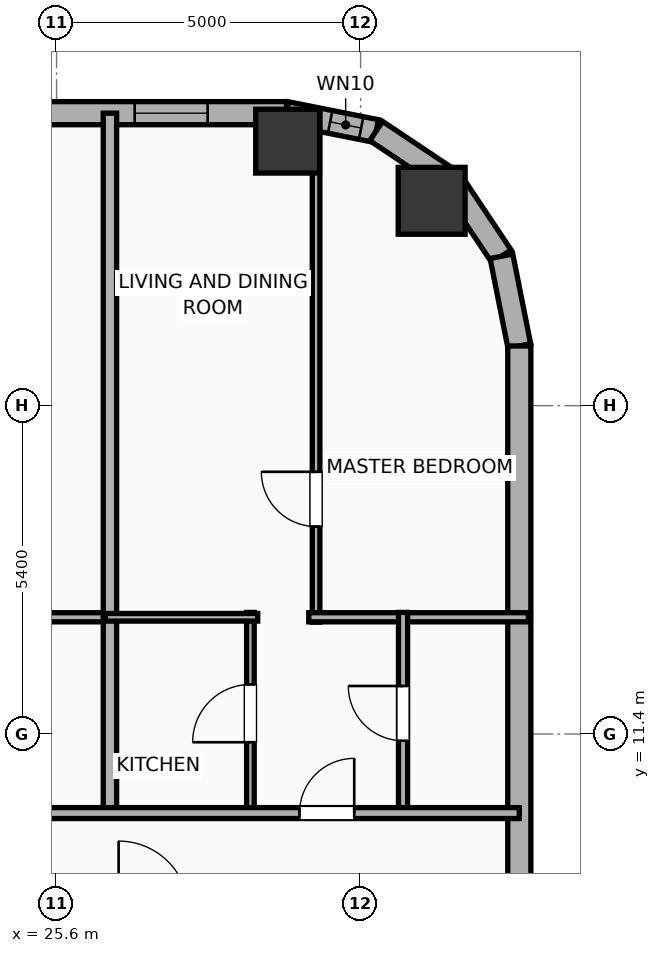
"""IFC4 building model, lengths in metres.
Left out: names, types, materials, properties, quantities, classifications, styles, units other than length and angle.
Written with IfcOpenShell. Run it as: python <this file> out.ifc"""

import sys

from ifc_helpers import new_model, si_unit, direction, frame, frame_2d, origin, origin_2d, place, context, subcontext, project, spatial, rectangle, hollow_rectangle, hollow_circle, extrude, element, fill, save


model = new_model("IFC4")
c1 = context("Model", 3, precision=1e-05, world=origin(), true_north=direction((0.0, 1.0)))
c2 = subcontext(c1, "Body", "Model", "MODEL_VIEW")
j1 = project(units=[si_unit("LENGTHUNIT", "METRE"), si_unit("PLANEANGLEUNIT", "RADIAN")], contexts=[c1])
p1 = place(None, origin())
s1 = spatial("IfcSite", under=j1, at=p1, CompositionType="ELEMENT")
p2 = place(p1, origin())
s2 = spatial("IfcBuilding", under=s1, at=p2, CompositionType="ELEMENT")
p3 = place(p2, frame((0.0, 0.0, 124.8)))
s3 = spatial("IfcBuildingStorey", under=s2, at=p3, CompositionType="ELEMENT", Elevation=124.8)
p4 = place(p3, frame((31.769, 20.169, 0.0), z_axis=(0.0, 0.0, 1.0), x_axis=(1.0, 0.0, 0.0)))
e1 = element("IfcColumn", 1, at=p4, inside=s3, PredefinedType="COLUMN", context=c2, shape_type="SweptSolid", body=[
    extrude(hollow_circle(Radius=0.55, WallThickness=0.036, at=origin_2d()), origin(), (0.0, 0.0, 1.0), 3.9),
])
p5 = place(p3, frame((29.4, 21.15, 0.0), z_axis=(0.0, 0.0, 1.0), x_axis=(1.0, 0.0, 0.0)))
e2 = element("IfcColumn", 2, at=p5, inside=s3, PredefinedType="COLUMN", context=c2, shape_type="SweptSolid", body=[
    extrude(hollow_rectangle(XDim=1.05, YDim=1.05, WallThickness=0.036, at=origin_2d()), origin(), (0.0, 0.0, 1.0), 3.9),
])
p6 = place(p3, frame((-25.381, 21.61, 0.0), z_axis=(0.0, 0.0, 1.0), x_axis=(1.0, 0.0, 0.0)))
e3 = element("IfcWall", 3, at=p6, inside=s3, PredefinedType="ELEMENTEDWALL", context=c2, shape_type="SweptSolid", body=[
    extrude(rectangle(XDim=54.763, YDim=0.38, at=frame_2d((27.381, 0.0))), origin(), (0.0, 0.0, 1.0), 3.65),
])
p7 = place(p6, frame((4.795, 0.0, 0.75)))
e4 = element("IfcOpeningElement", 4, at=p7, cuts=e3, PredefinedType="OPENING", context=c2, shape_type="SweptSolid", body=[
    extrude(rectangle(XDim=2.4, YDim=2.1, at=frame_2d((1.2, 1.05))), frame((0.0, 0.2, 0.0), z_axis=(0.0, -1.0, 0.0), x_axis=(1.0, 0.0, 0.0)), (0.0, 0.0, 1.0), 0.4),
])
p8 = place(p6, frame((45.867, 0.0, 0.75)))
e5 = element("IfcOpeningElement", 5, at=p8, cuts=e3, PredefinedType="OPENING", context=c2, shape_type="SweptSolid", body=[
    extrude(rectangle(XDim=2.4, YDim=2.1, at=frame_2d((1.2, 1.05))), frame((0.0, 0.2, 0.0), z_axis=(0.0, -1.0, 0.0), x_axis=(1.0, 0.0, 0.0)), (0.0, 0.0, 1.0), 0.4),
])
p9 = place(p6, frame((2.408, 0.0, 0.75)))
e6 = element("IfcOpeningElement", 6, at=p9, cuts=e3, PredefinedType="OPENING", context=c2, shape_type="SweptSolid", body=[
    extrude(rectangle(XDim=1.2, YDim=2.05, at=frame_2d((0.6, 1.025))), frame((0.0, 0.2, 0.0), z_axis=(0.0, -1.0, 0.0), x_axis=(1.0, 0.0, 0.0)), (0.0, 0.0, 1.0), 0.4),
])
p10 = place(p6, frame((8.952, 0.0, 0.75)))
e7 = element("IfcOpeningElement", 7, at=p10, cuts=e3, PredefinedType="OPENING", context=c2, shape_type="SweptSolid", body=[
    extrude(rectangle(XDim=1.2, YDim=2.05, at=frame_2d((0.6, 1.025))), frame((0.0, 0.2, 0.0), z_axis=(0.0, -1.0, 0.0), x_axis=(1.0, 0.0, 0.0)), (0.0, 0.0, 1.0), 0.4),
])
p11 = place(p6, frame((17.132, 0.0, 0.75)))
e8 = element("IfcOpeningElement", 8, at=p11, cuts=e3, PredefinedType="OPENING", context=c2, shape_type="SweptSolid", body=[
    extrude(rectangle(XDim=1.2, YDim=2.05, at=frame_2d((0.6, 1.025))), frame((0.0, 0.2, 0.0), z_axis=(0.0, -1.0, 0.0), x_axis=(1.0, 0.0, 0.0)), (0.0, 0.0, 1.0), 0.4),
])
p12 = place(p6, frame((14.007, 0.0, 0.75)))
e9 = element("IfcOpeningElement", 9, at=p12, cuts=e3, PredefinedType="OPENING", context=c2, shape_type="SweptSolid", body=[
    extrude(rectangle(XDim=1.2, YDim=2.05, at=frame_2d((0.6, 1.025))), frame((0.0, 0.2, 0.0), z_axis=(0.0, -1.0, 0.0), x_axis=(1.0, 0.0, 0.0)), (0.0, 0.0, 1.0), 0.4),
])
p13 = place(p6, frame((22.636, 0.0, 0.75)))
e10 = element("IfcOpeningElement", 10, at=p13, cuts=e3, PredefinedType="OPENING", context=c2, shape_type="SweptSolid", body=[
    extrude(rectangle(XDim=1.2, YDim=2.05, at=frame_2d((0.6, 1.025))), frame((0.0, 0.2, 0.0), z_axis=(0.0, -1.0, 0.0), x_axis=(1.0, 0.0, 0.0)), (0.0, 0.0, 1.0), 0.4),
])
p14 = place(p6, frame((27.129, 0.0, 0.75)))
e11 = element("IfcOpeningElement", 11, at=p14, cuts=e3, PredefinedType="OPENING", context=c2, shape_type="SweptSolid", body=[
    extrude(rectangle(XDim=1.2, YDim=2.05, at=frame_2d((0.6, 1.025))), frame((0.0, 0.2, 0.0), z_axis=(0.0, -1.0, 0.0), x_axis=(1.0, 0.0, 0.0)), (0.0, 0.0, 1.0), 0.4),
])
p15 = place(p6, frame((30.254, 0.0, 0.75)))
e12 = element("IfcOpeningElement", 12, at=p15, cuts=e3, PredefinedType="OPENING", context=c2, shape_type="SweptSolid", body=[
    extrude(rectangle(XDim=1.2, YDim=2.05, at=frame_2d((0.6, 1.025))), frame((0.0, 0.2, 0.0), z_axis=(0.0, -1.0, 0.0), x_axis=(1.0, 0.0, 0.0)), (0.0, 0.0, 1.0), 0.4),
])
p16 = place(p6, frame((33.603, 0.0, 0.75)))
e13 = element("IfcOpeningElement", 13, at=p16, cuts=e3, PredefinedType="OPENING", context=c2, shape_type="SweptSolid", body=[
    extrude(rectangle(XDim=1.2, YDim=2.05, at=frame_2d((0.6, 1.025))), frame((0.0, 0.2, 0.0), z_axis=(0.0, -1.0, 0.0), x_axis=(1.0, 0.0, 0.0)), (0.0, 0.0, 1.0), 0.4),
])
p17 = place(p6, frame((36.608, 0.0, 0.75)))
e14 = element("IfcOpeningElement", 14, at=p17, cuts=e3, PredefinedType="OPENING", context=c2, shape_type="SweptSolid", body=[
    extrude(rectangle(XDim=1.2, YDim=2.05, at=frame_2d((0.6, 1.025))), frame((0.0, 0.2, 0.0), z_axis=(0.0, -1.0, 0.0), x_axis=(1.0, 0.0, 0.0)), (0.0, 0.0, 1.0), 0.4),
])
p18 = place(p6, frame((39.446, 0.0, 0.75)))
e15 = element("IfcOpeningElement", 15, at=p18, cuts=e3, PredefinedType="OPENING", context=c2, shape_type="SweptSolid", body=[
    extrude(rectangle(XDim=1.2, YDim=2.05, at=frame_2d((0.6, 1.025))), frame((0.0, 0.2, 0.0), z_axis=(0.0, -1.0, 0.0), x_axis=(1.0, 0.0, 0.0)), (0.0, 0.0, 1.0), 0.4),
])
p19 = place(p6, frame((42.27, 0.0, 0.75)))
e16 = element("IfcOpeningElement", 16, at=p19, cuts=e3, PredefinedType="OPENING", context=c2, shape_type="SweptSolid", body=[
    extrude(rectangle(XDim=0.85, YDim=2.05, at=frame_2d((0.425, 1.025))), frame((0.0, 0.2, 0.0), z_axis=(0.0, -1.0, 0.0), x_axis=(1.0, 0.0, 0.0)), (0.0, 0.0, 1.0), 0.4),
])
p20 = place(p6, frame((49.554, 0.0, 0.75)))
e17 = element("IfcOpeningElement", 17, at=p20, cuts=e3, PredefinedType="OPENING", context=c2, shape_type="SweptSolid", body=[
    extrude(rectangle(XDim=1.2, YDim=2.05, at=frame_2d((0.6, 1.025))), frame((0.0, 0.2, 0.0), z_axis=(0.0, -1.0, 0.0), x_axis=(1.0, 0.0, 0.0)), (0.0, 0.0, 1.0), 0.4),
])
p21 = place(p6, frame((52.266, 0.0, 0.75)))
e18 = element("IfcOpeningElement", 18, at=p21, cuts=e3, PredefinedType="OPENING", context=c2, shape_type="SweptSolid", body=[
    extrude(rectangle(XDim=1.2, YDim=2.05, at=frame_2d((0.6, 1.025))), frame((0.0, 0.2, 0.0), z_axis=(0.0, -1.0, 0.0), x_axis=(1.0, 0.0, 0.0)), (0.0, 0.0, 1.0), 0.4),
])
p22 = place(p3, frame((29.381, 21.61, 0.0), z_axis=(0.0, 0.0, 1.0), x_axis=(0.980755066645, -0.195242155415, 0.0)))
e19 = element("IfcWall", 19, at=p22, inside=s3, PredefinedType="ELEMENTEDWALL", context=c2, shape_type="SweptSolid", body=[
    extrude(rectangle(XDim=1.504, YDim=0.38, at=frame_2d((0.752, 0.0))), origin(), (0.0, 0.0, 1.0), 3.65),
])
p23 = place(p22, frame((0.732, 0.0, 0.75)))
e20 = element("IfcOpeningElement", 20, at=p23, cuts=e19, PredefinedType="OPENING", context=c2, shape_type="SweptSolid", body=[
    extrude(rectangle(XDim=0.52, YDim=2.05, at=frame_2d((0.26, 1.025))), frame((0.0, 0.2, 0.0), z_axis=(0.0, -1.0, 0.0), x_axis=(1.0, 0.0, 0.0)), (0.0, 0.0, 1.0), 0.4),
])
p24 = place(p3, frame((30.857, 21.316, 0.0), z_axis=(0.0, 0.0, 1.0), x_axis=(0.831468045563, -0.555572577804, 0.0)))
e21 = element("IfcWall", 21, at=p24, inside=s3, PredefinedType="ELEMENTEDWALL", context=c2, shape_type="SweptSolid", body=[
    extrude(rectangle(XDim=1.485, YDim=0.38, at=frame_2d((0.742, 0.0))), origin(), (0.0, 0.0, 1.0), 3.65),
])
p25 = place(p3, frame((32.091, 20.491, 0.0), z_axis=(0.0, 0.0, 1.0), x_axis=(0.555610286119, -0.831442848281, 0.0)))
e22 = element("IfcWall", 22, at=p25, inside=s3, PredefinedType="ELEMENTEDWALL", context=c2, shape_type="SweptSolid", body=[
    extrude(rectangle(XDim=1.485, YDim=0.38, at=frame_2d((0.743, 0.0))), origin(), (0.0, 0.0, 1.0), 3.65),
])
p26 = place(p3, frame((32.917, 19.257, 0.0), z_axis=(0.0, 0.0, 1.0), x_axis=(0.195086038585, -0.980786132421, 0.0)))
e23 = element("IfcWall", 23, at=p26, inside=s3, PredefinedType="ELEMENTEDWALL", context=c2, shape_type="SweptSolid", body=[
    extrude(rectangle(XDim=1.504, YDim=0.38, at=frame_2d((0.752, 0.0))), origin(), (0.0, 0.0, 1.0), 3.65),
])
p27 = place(p3, frame((33.21, 17.781, 0.0), z_axis=(0.0, 0.0, 1.0), x_axis=(0.0, -1.0, 0.0)))
e24 = element("IfcWall", 24, at=p27, inside=s3, PredefinedType="ELEMENTEDWALL", context=c2, shape_type="SweptSolid", body=[
    extrude(rectangle(XDim=34.363, YDim=0.38, at=frame_2d((17.181, 0.0))), origin(), (0.0, 0.0, 1.0), 3.65),
])
p28 = place(p27, frame((12.836, 0.0, 0.75)))
e25 = element("IfcOpeningElement", 25, at=p28, cuts=e24, PredefinedType="OPENING", context=c2, shape_type="SweptSolid", body=[
    extrude(rectangle(XDim=1.2, YDim=2.05, at=frame_2d((0.6, 1.025))), frame((0.0, 0.2, 0.0), z_axis=(0.0, -1.0, 0.0), x_axis=(1.0, 0.0, 0.0)), (0.0, 0.0, 1.0), 0.4),
])
p29 = place(p27, frame((21.386, 0.0, 0.75)))
e26 = element("IfcOpeningElement", 26, at=p29, cuts=e24, PredefinedType="OPENING", context=c2, shape_type="SweptSolid", body=[
    extrude(rectangle(XDim=1.2, YDim=2.05, at=frame_2d((0.6, 1.025))), frame((0.0, 0.2, 0.0), z_axis=(0.0, -1.0, 0.0), x_axis=(1.0, 0.0, 0.0)), (0.0, 0.0, 1.0), 0.4),
])
p30 = place(p3, frame((22.948, 13.32, 0.0), z_axis=(0.0, 0.0, 1.0), x_axis=(1.0, 0.0, 0.0)))
e27 = element("IfcWall", 27, at=p30, inside=s3, PredefinedType="PLUMBINGWALL", context=c2, shape_type="SweptSolid", body=[
    extrude(rectangle(XDim=3.605, YDim=0.15, at=frame_2d((1.802, 0.0))), origin(), (0.0, 0.0, 1.0), 3.65),
])
p31 = place(p3, frame((26.478, 10.02, 0.0), z_axis=(0.0, 0.0, 1.0), x_axis=(0.0, 1.0, 0.0)))
e28 = element("IfcWall", 28, at=p31, inside=s3, PredefinedType="PARTITIONING", context=c2, shape_type="SweptSolid", body=[
    extrude(rectangle(XDim=11.59, YDim=0.22, at=frame_2d((5.795, 0.0))), origin(), (0.0, 0.0, 1.0), 3.65),
])
p32 = place(p3, frame((29.868, 13.24, 0.0), z_axis=(0.0, 0.0, 1.0), x_axis=(0.0, 1.0, 0.0)))
e29 = element("IfcWall", 29, at=p32, inside=s3, PredefinedType="PARTITIONING", context=c2, shape_type="SweptSolid", body=[
    extrude(rectangle(XDim=8.426, YDim=0.125, at=frame_2d((4.213, 0.0))), origin(), (0.0, 0.0, 1.0), 3.65),
])
p33 = place(p32, frame((1.572, 0.0, 0.0)))
e30 = element("IfcOpeningElement", 30, at=p33, cuts=e29, PredefinedType="OPENING", context=c2, shape_type="SweptSolid", body=[
    extrude(rectangle(XDim=0.9, YDim=2.05, at=frame_2d((0.45, 1.025))), frame((0.0, 0.073, 0.0), z_axis=(0.0, -1.0, 0.0), x_axis=(1.0, 0.0, 0.0)), (0.0, 0.0, 1.0), 0.145),
])
p34 = place(p3, frame((29.748, 13.32, 0.0), z_axis=(0.0, 0.0, 1.0), x_axis=(1.0, 0.0, 0.0)))
e31 = element("IfcWall", 31, at=p34, inside=s3, PredefinedType="PLUMBINGWALL", context=c2, shape_type="SweptSolid", body=[
    extrude(rectangle(XDim=3.612, YDim=0.15, at=frame_2d((1.806, 0.0))), origin(), (0.0, 0.0, 1.0), 3.65),
])
p35 = place(p3, frame((28.788, 10.08, 0.0), z_axis=(0.0, 0.0, 1.0), x_axis=(0.0, 1.0, 0.0)))
e32 = element("IfcWall", 32, at=p35, inside=s3, PredefinedType="PARTITIONING", context=c2, shape_type="SweptSolid", body=[
    extrude(rectangle(XDim=3.32, YDim=0.125, at=frame_2d((1.66, 0.0))), origin(), (0.0, 0.0, 1.0), 3.65),
])
p36 = place(p35, frame((1.185, 0.0, 0.0)))
e33 = element("IfcOpeningElement", 33, at=p36, cuts=e32, PredefinedType="OPENING", context=c2, shape_type="SweptSolid", body=[
    extrude(rectangle(XDim=0.95, YDim=2.05, at=frame_2d((0.475, 1.025))), frame((0.0, 0.073, 0.0), z_axis=(0.0, -1.0, 0.0), x_axis=(1.0, 0.0, 0.0)), (0.0, 0.0, 1.0), 0.145),
])
p37 = place(p3, frame((26.403, 13.32, 0.0), z_axis=(0.0, 0.0, 1.0), x_axis=(1.0, 0.0, 0.0)))
e34 = element("IfcWall", 34, at=p37, inside=s3, PredefinedType="PARTITIONING", context=c2, shape_type="SweptSolid", body=[
    extrude(rectangle(XDim=2.505, YDim=0.125, at=frame_2d((1.252, 0.0))), origin(), (0.0, 0.0, 1.0), 3.65),
])
p38 = place(p3, frame((31.298, 10.08, 0.0), z_axis=(0.0, 0.0, 1.0), x_axis=(0.0, 1.0, 0.0)))
e35 = element("IfcWall", 35, at=p38, inside=s3, PredefinedType="PLUMBINGWALL", context=c2, shape_type="SweptSolid", body=[
    extrude(rectangle(XDim=3.32, YDim=0.15, at=frame_2d((1.66, 0.0))), origin(), (0.0, 0.0, 1.0), 3.65),
])
p39 = place(p38, frame((1.21, 0.0, 0.0)))
e36 = element("IfcOpeningElement", 36, at=p39, cuts=e35, PredefinedType="OPENING", context=c2, shape_type="SweptSolid", body=[
    extrude(rectangle(XDim=0.9, YDim=2.05, at=frame_2d((0.45, 1.025))), frame((0.0, 0.085, 0.0), z_axis=(0.0, -1.0, 0.0), x_axis=(1.0, 0.0, 0.0)), (0.0, 0.0, 1.0), 0.17),
])
p40 = place(p3, frame((-29.21, 10.1, 0.0), z_axis=(0.0, 0.0, 1.0), x_axis=(1.0, 0.0, 0.0)))
e37 = element("IfcWall", 37, at=p40, inside=s3, PredefinedType="PARTITIONING", context=c2, shape_type="SweptSolid", body=[
    extrude(rectangle(XDim=62.42, YDim=0.18, at=frame_2d((31.21, 0.0))), origin(), (0.0, 0.0, 1.0), 3.65),
])
p41 = place(p40, frame((2.54, 0.0, 0.0)))
e38 = element("IfcOpeningElement", 38, at=p41, cuts=e37, PredefinedType="OPENING", context=c2, shape_type="SweptSolid", body=[
    extrude(rectangle(XDim=0.9, YDim=2.05, at=frame_2d((0.45, 1.025))), frame((0.0, 0.1, 0.0), z_axis=(0.0, -1.0, 0.0), x_axis=(1.0, 0.0, 0.0)), (0.0, 0.0, 1.0), 0.2),
])
p42 = place(p40, frame((9.1, 0.0, 0.0)))
e39 = element("IfcOpeningElement", 39, at=p42, cuts=e37, PredefinedType="OPENING", context=c2, shape_type="SweptSolid", body=[
    extrude(rectangle(XDim=1.15, YDim=2.05, at=frame_2d((0.575, 1.025))), frame((0.0, 0.1, 0.0), z_axis=(0.0, -1.0, 0.0), x_axis=(1.0, 0.0, 0.0)), (0.0, 0.0, 1.0), 0.2),
])
p43 = place(p40, frame((14.063, 0.0, 0.0)))
e40 = element("IfcOpeningElement", 40, at=p43, cuts=e37, PredefinedType="OPENING", context=c2, shape_type="SweptSolid", body=[
    extrude(rectangle(XDim=0.9, YDim=2.05, at=frame_2d((0.45, 1.025))), frame((0.0, 0.1, 0.0), z_axis=(0.0, -1.0, 0.0), x_axis=(1.0, 0.0, 0.0)), (0.0, 0.0, 1.0), 0.2),
])
p44 = place(p40, frame((20.954, 0.0, 0.0)))
e41 = element("IfcOpeningElement", 41, at=p44, cuts=e37, PredefinedType="OPENING", context=c2, shape_type="SweptSolid", body=[
    extrude(rectangle(XDim=1.15, YDim=2.05, at=frame_2d((0.575, 1.025))), frame((0.0, 0.1, 0.0), z_axis=(0.0, -1.0, 0.0), x_axis=(1.0, 0.0, 0.0)), (0.0, 0.0, 1.0), 0.2),
])
p45 = place(p40, frame((26.26, 0.0, 0.0)))
e42 = element("IfcOpeningElement", 42, at=p45, cuts=e37, PredefinedType="OPENING", context=c2, shape_type="SweptSolid", body=[
    extrude(rectangle(XDim=0.9, YDim=2.05, at=frame_2d((0.45, 1.025))), frame((0.0, 0.1, 0.0), z_axis=(0.0, -1.0, 0.0), x_axis=(1.0, 0.0, 0.0)), (0.0, 0.0, 1.0), 0.2),
])
p46 = place(p40, frame((31.01, 0.0, 0.0)))
e43 = element("IfcOpeningElement", 43, at=p46, cuts=e37, PredefinedType="OPENING", context=c2, shape_type="SweptSolid", body=[
    extrude(rectangle(XDim=1.15, YDim=2.05, at=frame_2d((0.575, 1.025))), frame((0.0, 0.1, 0.0), z_axis=(0.0, -1.0, 0.0), x_axis=(1.0, 0.0, 0.0)), (0.0, 0.0, 1.0), 0.2),
])
p47 = place(p40, frame((37.37, 0.0, 0.0)))
e44 = element("IfcOpeningElement", 44, at=p47, cuts=e37, PredefinedType="OPENING", context=c2, shape_type="SweptSolid", body=[
    extrude(rectangle(XDim=1.15, YDim=2.05, at=frame_2d((0.575, 1.025))), frame((0.0, 0.1, 0.0), z_axis=(0.0, -1.0, 0.0), x_axis=(1.0, 0.0, 0.0)), (0.0, 0.0, 1.0), 0.2),
])
p48 = place(p40, frame((45.298, 0.0, 0.0)))
e45 = element("IfcOpeningElement", 45, at=p48, cuts=e37, PredefinedType="OPENING", context=c2, shape_type="SweptSolid", body=[
    extrude(rectangle(XDim=0.9, YDim=2.05, at=frame_2d((0.45, 1.025))), frame((0.0, 0.1, 0.0), z_axis=(0.0, -1.0, 0.0), x_axis=(1.0, 0.0, 0.0)), (0.0, 0.0, 1.0), 0.2),
])
p49 = place(p40, frame((52.033, 0.0, 0.0)))
e46 = element("IfcOpeningElement", 46, at=p49, cuts=e37, PredefinedType="OPENING", context=c2, shape_type="SweptSolid", body=[
    extrude(rectangle(XDim=0.9, YDim=2.05, at=frame_2d((0.45, 1.025))), frame((0.0, 0.1, 0.0), z_axis=(0.0, -1.0, 0.0), x_axis=(1.0, 0.0, 0.0)), (0.0, 0.0, 1.0), 0.2),
])
p50 = place(p40, frame((58.805, 0.0, 0.0)))
e47 = element("IfcOpeningElement", 47, at=p50, cuts=e37, PredefinedType="OPENING", context=c2, shape_type="SweptSolid", body=[
    extrude(rectangle(XDim=0.9, YDim=2.05, at=frame_2d((0.45, 1.025))), frame((0.0, 0.1, 0.0), z_axis=(0.0, -1.0, 0.0), x_axis=(1.0, 0.0, 0.0)), (0.0, 0.0, 1.0), 0.2),
])
p51 = place(p21, origin())
e48 = element("IfcWindow", 48, at=p51, inside=s3, PartitioningType="SINGLE_PANEL", PredefinedType="WINDOW", context=c2, shape_type="SweptSolid", body=[
    extrude(rectangle(XDim=1.2, YDim=2.05, at=frame_2d((0.6, 1.025))), frame((0.0, 0.03, 0.0), z_axis=(0.0, -1.0, 0.0), x_axis=(1.0, 0.0, 0.0)), (0.0, 0.0, 1.0), 0.06),
])
fill(e18, e48)
p52 = place(p23, origin())
e49 = element("IfcWindow", 49, at=p52, inside=s3, PartitioningType="SINGLE_PANEL", PredefinedType="WINDOW", context=c2, shape_type="SweptSolid", body=[
    extrude(rectangle(XDim=0.52, YDim=2.05, at=frame_2d((0.26, 1.025))), frame((0.0, 0.03, 0.0), z_axis=(0.0, -1.0, 0.0), x_axis=(1.0, 0.0, 0.0)), (0.0, 0.0, 1.0), 0.06),
])
fill(e20, e49)
p53 = place(p33, origin())
e50 = element("IfcDoor", 50, at=p53, inside=s3, OperationType="SINGLE_SWING_RIGHT", PredefinedType="DOOR", context=c2, shape_type="SweptSolid", body=[
    extrude(rectangle(XDim=0.9, YDim=2.05, at=frame_2d((0.45, 1.025))), frame((0.0, 0.025, 0.0), z_axis=(0.0, -1.0, 0.0), x_axis=(1.0, 0.0, 0.0)), (0.0, 0.0, 1.0), 0.05),
])
fill(e30, e50)
p54 = place(p36, origin())
e51 = element("IfcDoor", 51, at=p54, inside=s3, OperationType="SINGLE_SWING_LEFT", PredefinedType="DOOR", context=c2, shape_type="SweptSolid", body=[
    extrude(rectangle(XDim=0.95, YDim=2.05, at=frame_2d((0.475, 1.025))), frame((0.0, 0.025, 0.0), z_axis=(0.0, -1.0, 0.0), x_axis=(1.0, 0.0, 0.0)), (0.0, 0.0, 1.0), 0.05),
])
fill(e33, e51)
p55 = place(p39, origin())
e52 = element("IfcDoor", 52, at=p55, inside=s3, OperationType="SINGLE_SWING_RIGHT", PredefinedType="DOOR", context=c2, shape_type="SweptSolid", body=[
    extrude(rectangle(XDim=0.9, YDim=2.05, at=frame_2d((0.45, 1.025))), frame((0.0, 0.025, 0.0), z_axis=(0.0, -1.0, 0.0), x_axis=(1.0, 0.0, 0.0)), (0.0, 0.0, 1.0), 0.05),
])
fill(e36, e52)
p56 = place(p50, origin())
e53 = element("IfcDoor", 53, at=p56, inside=s3, OperationType="SINGLE_SWING_RIGHT", PredefinedType="DOOR", context=c2, shape_type="SweptSolid", body=[
    extrude(rectangle(XDim=0.9, YDim=2.05, at=frame_2d((0.45, 1.025))), frame((0.0, 0.025, 0.0), z_axis=(0.0, -1.0, 0.0), x_axis=(1.0, 0.0, 0.0)), (0.0, 0.0, 1.0), 0.05),
])
fill(e47, e53)
save(model, sys.argv[1])
